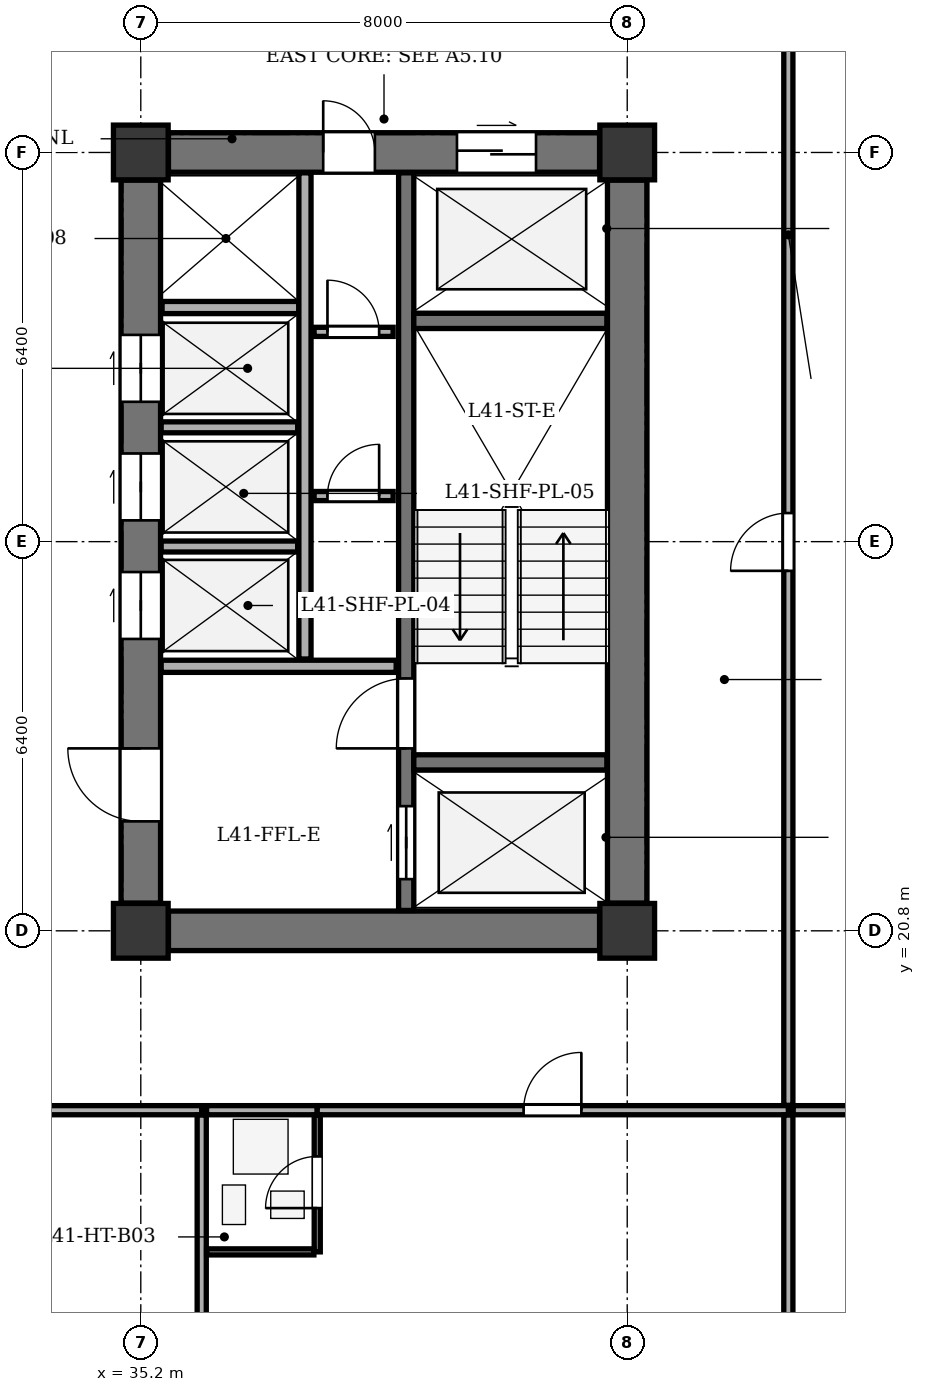
"""IFC4 building model, lengths in metres.
Left out: names, types, materials, properties, quantities, classifications, styles, units other than length and angle.
Written with IfcOpenShell. Run it as: python <this file> out.ifc"""

import sys

from ifc_helpers import new_model, si_unit, direction, frame, frame_2d, origin, origin_2d, place, context, subcontext, project, spatial, rectangle, extrude, element, fill, save


model = new_model("IFC4")
c1 = context("Model", 3, precision=1e-05, world=origin(), true_north=direction((0.0, 1.0)))
c2 = subcontext(c1, "Body", "Model", "MODEL_VIEW")
j1 = project(units=[si_unit("LENGTHUNIT", "METRE"), si_unit("PLANEANGLEUNIT", "RADIAN")], contexts=[c1])
p1 = place(None, origin())
s1 = spatial("IfcSite", under=j1, at=p1, CompositionType="ELEMENT")
p2 = place(p1, origin())
s2 = spatial("IfcBuilding", under=s1, at=p2, CompositionType="ELEMENT")
p3 = place(p2, frame((0.0, 0.0, 162.3)))
s3 = spatial("IfcBuildingStorey", under=s2, at=p3, CompositionType="ELEMENT", Elevation=162.3)
for number, where, z_axis, x_axis in (
    (1, (35.2, 20.8, 0.0), (0.0, 0.0, 1.0), (1.0, 0.0, 0.0)),
    (2, (43.2, 20.8, 0.0), (0.0, 0.0, 1.0), (1.0, 0.0, 0.0)),
    (3, (35.2, 33.6, 0.0), (0.0, 0.0, 1.0), (1.0, 0.0, 0.0)),
    (4, (43.2, 33.6, 0.0), (0.0, 0.0, 1.0), (1.0, 0.0, 0.0)),
):
    element("IfcColumn", number, at=place(p3, frame(where, z_axis=z_axis, x_axis=x_axis)), inside=s3, PredefinedType="COLUMN", context=c2, shape_type="SweptSolid", body=[
        extrude(rectangle(XDim=0.9, YDim=0.9, at=origin_2d()), origin(), (0.0, 0.0, 1.0), 3.5),
    ])
p4 = place(p3, frame((43.2, 21.255, 0.0), z_axis=(0.0, 0.0, 1.0), x_axis=(0.0, 1.0, 0.0)))
e5 = element("IfcWall", 5, at=p4, inside=s3, PredefinedType="SHEAR", context=c2, shape_type="SweptSolid", body=[
    extrude(rectangle(XDim=11.89, YDim=0.65, at=frame_2d((5.945, 0.0))), origin(), (0.0, 0.0, 1.0), 3.2),
])
p5 = place(p3, frame((35.655, 20.8, 0.0), z_axis=(0.0, 0.0, 1.0), x_axis=(1.0, 0.0, 0.0)))
e6 = element("IfcWall", 6, at=p5, inside=s3, PredefinedType="SHEAR", context=c2, shape_type="SweptSolid", body=[
    extrude(rectangle(XDim=7.09, YDim=0.65, at=frame_2d((3.545, 0.0))), origin(), (0.0, 0.0, 1.0), 3.2),
])
p6 = place(p3, frame((35.655, 33.6, 0.0), z_axis=(0.0, 0.0, 1.0), x_axis=(1.0, 0.0, 0.0)))
e7 = element("IfcWall", 7, at=p6, inside=s3, PredefinedType="SHEAR", context=c2, shape_type="SweptSolid", body=[
    extrude(rectangle(XDim=7.09, YDim=0.65, at=frame_2d((3.545, 0.0))), origin(), (0.0, 0.0, 1.0), 3.2),
])
p7 = place(p6, frame((4.745, 0.0, 0.0)))
e8 = element("IfcOpeningElement", 8, at=p7, cuts=e7, PredefinedType="OPENING", context=c2, shape_type="SweptSolid", body=[
    extrude(rectangle(XDim=1.3, YDim=2.15, at=frame_2d((0.65, 1.075))), frame((0.0, 0.335, 0.0), z_axis=(0.0, -1.0, 0.0), x_axis=(1.0, 0.0, 0.0)), (0.0, 0.0, 1.0), 0.67),
])
p8 = place(p6, frame((2.545, 0.0, 0.0)))
e9 = element("IfcOpeningElement", 9, at=p8, cuts=e7, PredefinedType="OPENING", context=c2, shape_type="SweptSolid", body=[
    extrude(rectangle(XDim=0.85, YDim=2.02, at=frame_2d((0.425, 1.01))), frame((0.0, 0.335, 0.0), z_axis=(0.0, -1.0, 0.0), x_axis=(1.0, 0.0, 0.0)), (0.0, 0.0, 1.0), 0.67),
])
p9 = place(p3, frame((35.2, 21.255, 0.0), z_axis=(0.0, 0.0, 1.0), x_axis=(0.0, 1.0, 0.0)))
e10 = element("IfcWall", 10, at=p9, inside=s3, PredefinedType="SHEAR", context=c2, shape_type="SweptSolid", body=[
    extrude(rectangle(XDim=11.89, YDim=0.65, at=frame_2d((5.945, 0.0))), origin(), (0.0, 0.0, 1.0), 3.2),
])
p10 = place(p9, frame((1.345, 0.0, 0.0)))
e11 = element("IfcOpeningElement", 11, at=p10, cuts=e10, PredefinedType="OPENING", context=c2, shape_type="SweptSolid", body=[
    extrude(rectangle(XDim=1.2, YDim=2.15, at=frame_2d((0.6, 1.075))), frame((0.0, 0.335, 0.0), z_axis=(0.0, -1.0, 0.0), x_axis=(1.0, 0.0, 0.0)), (0.0, 0.0, 1.0), 0.67),
])
p11 = place(p9, frame((4.345, 0.0, 0.0)))
e12 = element("IfcOpeningElement", 12, at=p11, cuts=e10, PredefinedType="OPENING", context=c2, shape_type="SweptSolid", body=[
    extrude(rectangle(XDim=1.1, YDim=2.1, at=frame_2d((0.55, 1.05))), frame((0.0, 0.335, 0.0), z_axis=(0.0, -1.0, 0.0), x_axis=(1.0, 0.0, 0.0)), (0.0, 0.0, 1.0), 0.67),
])
p12 = place(p9, frame((6.295, 0.0, 0.0)))
e13 = element("IfcOpeningElement", 13, at=p12, cuts=e10, PredefinedType="OPENING", context=c2, shape_type="SweptSolid", body=[
    extrude(rectangle(XDim=1.1, YDim=2.1, at=frame_2d((0.55, 1.05))), frame((0.0, 0.335, 0.0), z_axis=(0.0, -1.0, 0.0), x_axis=(1.0, 0.0, 0.0)), (0.0, 0.0, 1.0), 0.67),
])
p13 = place(p9, frame((8.245, 0.0, 0.0)))
e14 = element("IfcOpeningElement", 14, at=p13, cuts=e10, PredefinedType="OPENING", context=c2, shape_type="SweptSolid", body=[
    extrude(rectangle(XDim=1.1, YDim=2.1, at=frame_2d((0.55, 1.05))), frame((0.0, 0.335, 0.0), z_axis=(0.0, -1.0, 0.0), x_axis=(1.0, 0.0, 0.0)), (0.0, 0.0, 1.0), 0.67),
])
p14 = place(p3, frame((39.565, 21.135, 0.0), z_axis=(0.0, 0.0, 1.0), x_axis=(0.0, 1.0, 0.0)))
e15 = element("IfcWall", 15, at=p14, inside=s3, PredefinedType="SHEAR", context=c2, shape_type="SweptSolid", body=[
    extrude(rectangle(XDim=12.13, YDim=0.25, at=frame_2d((6.065, 0.0))), origin(), (0.0, 0.0, 1.0), 3.2),
])
p15 = place(p14, frame((0.515, 0.0, 0.0)))
e16 = element("IfcOpeningElement", 16, at=p15, cuts=e15, PredefinedType="OPENING", context=c2, shape_type="SweptSolid", body=[
    extrude(rectangle(XDim=1.2, YDim=2.15, at=frame_2d((0.6, 1.075))), frame((0.0, 0.135, 0.0), z_axis=(0.0, -1.0, 0.0), x_axis=(1.0, 0.0, 0.0)), (0.0, 0.0, 1.0), 0.27),
])
p16 = place(p14, frame((2.665, 0.0, 0.0)))
e17 = element("IfcOpeningElement", 17, at=p16, cuts=e15, PredefinedType="OPENING", context=c2, shape_type="SweptSolid", body=[
    extrude(rectangle(XDim=1.15, YDim=2.15, at=frame_2d((0.575, 1.075))), frame((0.0, 0.135, 0.0), z_axis=(0.0, -1.0, 0.0), x_axis=(1.0, 0.0, 0.0)), (0.0, 0.0, 1.0), 0.27),
])
for number, where, z_axis, x_axis in (
    (18, (39.69, 23.57, 0.0), (0.0, 0.0, 1.0), (1.0, 0.0, 0.0)),
    (19, (39.69, 30.83, 0.0), (0.0, 0.0, 1.0), (1.0, 0.0, 0.0)),
):
    element("IfcWall", number, at=place(p3, frame(where, z_axis=z_axis, x_axis=x_axis)), inside=s3, PredefinedType="SHEAR", context=c2, shape_type="SweptSolid", body=[
        extrude(rectangle(XDim=3.175, YDim=0.25, at=frame_2d((1.587, 0.0))), origin(), (0.0, 0.0, 1.0), 3.2),
    ])
p17 = place(p3, frame((35.535, 25.15, 0.0), z_axis=(0.0, 0.0, 1.0), x_axis=(1.0, 0.0, 0.0)))
e20 = element("IfcWall", 20, at=p17, inside=s3, PredefinedType="SOLIDWALL", context=c2, shape_type="SweptSolid", body=[
    extrude(rectangle(XDim=3.865, YDim=0.2, at=frame_2d((1.933, 0.0))), origin(), (0.0, 0.0, 1.0), 3.2),
])
p18 = place(p3, frame((35.55, 31.05, 0.0), z_axis=(0.0, 0.0, 1.0), x_axis=(1.0, 0.0, 0.0)))
e21 = element("IfcWall", 21, at=p18, inside=s3, PredefinedType="SOLIDWALL", context=c2, shape_type="SweptSolid", body=[
    extrude(rectangle(XDim=2.25, YDim=0.2, at=frame_2d((1.125, 0.0))), origin(), (0.0, 0.0, 1.0), 3.2),
])
p19 = place(p3, frame((37.9, 25.27, 0.0), z_axis=(0.0, 0.0, 1.0), x_axis=(0.0, 1.0, 0.0)))
e22 = element("IfcWall", 22, at=p19, inside=s3, PredefinedType="SOLIDWALL", context=c2, shape_type="SweptSolid", body=[
    extrude(rectangle(XDim=7.995, YDim=0.2, at=frame_2d((3.998, 0.0))), origin(), (0.0, 0.0, 1.0), 3.2),
])
for number, where, z_axis, x_axis in (
    (23, (35.535, 27.12, 0.0), (0.0, 0.0, 1.0), (1.0, 0.0, 0.0)),
    (24, (35.535, 29.08, 0.0), (0.0, 0.0, 1.0), (1.0, 0.0, 0.0)),
):
    element("IfcWall", number, at=place(p3, frame(where, z_axis=z_axis, x_axis=x_axis)), inside=s3, PredefinedType="PARTITIONING", context=c2, shape_type="SweptSolid", body=[
        extrude(rectangle(XDim=2.245, YDim=0.18, at=frame_2d((1.123, 0.0))), origin(), (0.0, 0.0, 1.0), 3.2),
    ])
p20 = place(p3, frame((38.05, 27.95, 0.0), z_axis=(0.0, 0.0, 1.0), x_axis=(1.0, 0.0, 0.0)))
e25 = element("IfcWall", 25, at=p20, inside=s3, PredefinedType="PARTITIONING", context=c2, shape_type="SweptSolid", body=[
    extrude(rectangle(XDim=1.3, YDim=0.15, at=frame_2d((0.65, 0.0))), origin(), (0.0, 0.0, 1.0), 3.2),
])
p21 = place(p20, frame((0.22, 0.0, 0.0)))
e26 = element("IfcOpeningElement", 26, at=p21, cuts=e25, PredefinedType="OPENING", context=c2, shape_type="SweptSolid", body=[
    extrude(rectangle(XDim=0.85, YDim=2.02, at=frame_2d((0.425, 1.01))), frame((0.0, 0.085, 0.0), z_axis=(0.0, -1.0, 0.0), x_axis=(1.0, 0.0, 0.0)), (0.0, 0.0, 1.0), 0.17),
])
p22 = place(p3, frame((38.05, 30.65, 0.0), z_axis=(0.0, 0.0, 1.0), x_axis=(1.0, 0.0, 0.0)))
e27 = element("IfcWall", 27, at=p22, inside=s3, PredefinedType="PARTITIONING", context=c2, shape_type="SweptSolid", body=[
    extrude(rectangle(XDim=1.3, YDim=0.15, at=frame_2d((0.65, 0.0))), origin(), (0.0, 0.0, 1.0), 3.2),
])
p23 = place(p22, frame((0.22, 0.0, 0.0)))
e28 = element("IfcOpeningElement", 28, at=p23, cuts=e27, PredefinedType="OPENING", context=c2, shape_type="SweptSolid", body=[
    extrude(rectangle(XDim=0.85, YDim=2.02, at=frame_2d((0.425, 1.01))), frame((0.0, 0.085, 0.0), z_axis=(0.0, -1.0, 0.0), x_axis=(1.0, 0.0, 0.0)), (0.0, 0.0, 1.0), 0.17),
])
p24 = place(p3, frame((27.549, 17.85, 0.0), z_axis=(0.0, 0.0, 1.0), x_axis=(1.0, 0.0, 0.0)))
e29 = element("IfcWall", 29, at=p24, inside=s3, PredefinedType="PARTITIONING", context=c2, shape_type="SweptSolid", body=[
    extrude(rectangle(XDim=8.653, YDim=0.15, at=frame_2d((4.326, 0.0))), origin(), (0.0, 0.0, 1.0), 3.2),
])
p25 = place(p24, frame((3.846, 0.0, 0.0)))
e30 = element("IfcOpeningElement", 30, at=p25, cuts=e29, PredefinedType="OPENING", context=c2, shape_type="SweptSolid", body=[
    extrude(rectangle(XDim=0.95, YDim=2.1, at=frame_2d((0.475, 1.05))), frame((0.0, 0.085, 0.0), z_axis=(0.0, -1.0, 0.0), x_axis=(1.0, 0.0, 0.0)), (0.0, 0.0, 1.0), 0.17),
])
p26 = place(p3, frame((36.202, 8.275, 0.0), z_axis=(0.0, 0.0, 1.0), x_axis=(0.0, 1.0, 0.0)))
e31 = element("IfcWall", 31, at=p26, inside=s3, PredefinedType="PARTITIONING", context=c2, shape_type="SweptSolid", body=[
    extrude(rectangle(XDim=9.495, YDim=0.15, at=frame_2d((4.748, 0.0))), origin(), (0.0, 0.0, 1.0), 3.2),
])
p27 = place(p3, frame((36.282, 17.85, 0.0), z_axis=(0.0, 0.0, 1.0), x_axis=(1.0, 0.0, 0.0)))
e32 = element("IfcWall", 32, at=p27, inside=s3, PredefinedType="PARTITIONING", context=c2, shape_type="SweptSolid", body=[
    extrude(rectangle(XDim=1.82, YDim=0.15, at=frame_2d((0.91, 0.0))), origin(), (0.0, 0.0, 1.0), 3.2),
])
p28 = place(p3, frame((38.102, 17.85, 0.0), z_axis=(0.0, 0.0, 1.0), x_axis=(1.0, 0.0, 0.0)))
e33 = element("IfcWall", 33, at=p28, inside=s3, PredefinedType="PARTITIONING", context=c2, shape_type="SweptSolid", body=[
    extrude(rectangle(XDim=7.748, YDim=0.15, at=frame_2d((3.874, 0.0))), origin(), (0.0, 0.0, 1.0), 3.2),
])
p29 = place(p28, frame((3.394, 0.0, 0.0)))
e34 = element("IfcOpeningElement", 34, at=p29, cuts=e33, PredefinedType="OPENING", context=c2, shape_type="SweptSolid", body=[
    extrude(rectangle(XDim=0.95, YDim=2.1, at=frame_2d((0.475, 1.05))), frame((0.0, 0.085, 0.0), z_axis=(0.0, -1.0, 0.0), x_axis=(1.0, 0.0, 0.0)), (0.0, 0.0, 1.0), 0.17),
])
p30 = place(p3, frame((38.102, 15.52, 0.0), z_axis=(0.0, 0.0, 1.0), x_axis=(0.0, 1.0, 0.0)))
e35 = element("IfcWall", 35, at=p30, inside=s3, PredefinedType="PARTITIONING", context=c2, shape_type="SweptSolid", body=[
    extrude(rectangle(XDim=2.25, YDim=0.1, at=frame_2d((1.125, 0.0))), origin(), (0.0, 0.0, 1.0), 3.2),
])
p31 = place(p30, frame((0.72, 0.0, 0.0)))
e36 = element("IfcOpeningElement", 36, at=p31, cuts=e35, PredefinedType="OPENING", context=c2, shape_type="SweptSolid", body=[
    extrude(rectangle(XDim=0.85, YDim=2.05, at=frame_2d((0.425, 1.025))), frame((0.0, 0.06, 0.0), z_axis=(0.0, -1.0, 0.0), x_axis=(1.0, 0.0, 0.0)), (0.0, 0.0, 1.0), 0.12),
])
p32 = place(p3, frame((36.282, 15.52, 0.0), z_axis=(0.0, 0.0, 1.0), x_axis=(1.0, 0.0, 0.0)))
e37 = element("IfcWall", 37, at=p32, inside=s3, PredefinedType="PARTITIONING", context=c2, shape_type="SweptSolid", body=[
    extrude(rectangle(XDim=1.765, YDim=0.1, at=frame_2d((0.883, 0.0))), origin(), (0.0, 0.0, 1.0), 3.2),
])
p33 = place(p3, frame((45.85, 8.275, 0.0), z_axis=(0.0, 0.0, 1.0), x_axis=(0.0, 1.0, 0.0)))
e38 = element("IfcWall", 38, at=p33, inside=s3, PredefinedType="PARTITIONING", context=c2, shape_type="SweptSolid", body=[
    extrude(rectangle(XDim=9.495, YDim=0.15, at=frame_2d((4.748, 0.0))), origin(), (0.0, 0.0, 1.0), 3.2),
])
p34 = place(p3, frame((45.93, 17.85, 0.0), z_axis=(0.0, 0.0, 1.0), x_axis=(1.0, 0.0, 0.0)))
e39 = element("IfcWall", 39, at=p34, inside=s3, PredefinedType="PARTITIONING", context=c2, shape_type="SweptSolid", body=[
    extrude(rectangle(XDim=9.395, YDim=0.15, at=frame_2d((4.698, 0.0))), origin(), (0.0, 0.0, 1.0), 3.2),
])
p35 = place(p3, frame((45.85, 17.93, 0.0), z_axis=(0.0, 0.0, 1.0), x_axis=(0.0, 1.0, 0.0)))
e40 = element("IfcWall", 40, at=p35, inside=s3, PredefinedType="PARTITIONING", context=c2, shape_type="SweptSolid", body=[
    extrude(rectangle(XDim=18.54, YDim=0.15, at=frame_2d((9.27, 0.0))), origin(), (0.0, 0.0, 1.0), 3.2),
])
p36 = place(p35, frame((8.79, 0.0, 0.0)))
e41 = element("IfcOpeningElement", 41, at=p36, cuts=e40, PredefinedType="OPENING", context=c2, shape_type="SweptSolid", body=[
    extrude(rectangle(XDim=0.95, YDim=2.1, at=frame_2d((0.475, 1.05))), frame((0.0, 0.085, 0.0), z_axis=(0.0, -1.0, 0.0), x_axis=(1.0, 0.0, 0.0)), (0.0, 0.0, 1.0), 0.17),
])
p37 = place(p7, origin())
e42 = element("IfcDoor", 42, at=p37, inside=s3, OperationType="DOUBLE_DOOR_SLIDING", PredefinedType="DOOR", context=c2, shape_type="SweptSolid", body=[
    extrude(rectangle(XDim=1.3, YDim=2.15, at=frame_2d((0.65, 1.075))), frame((0.0, 0.025, 0.0), z_axis=(0.0, -1.0, 0.0), x_axis=(1.0, 0.0, 0.0)), (0.0, 0.0, 1.0), 0.05),
])
fill(e8, e42)
p38 = place(p8, origin())
e43 = element("IfcDoor", 43, at=p38, inside=s3, OperationType="SINGLE_SWING_LEFT", PredefinedType="DOOR", context=c2, shape_type="SweptSolid", body=[
    extrude(rectangle(XDim=0.85, YDim=2.02, at=frame_2d((0.425, 1.01))), frame((0.0, 0.025, 0.0), z_axis=(0.0, -1.0, 0.0), x_axis=(1.0, 0.0, 0.0)), (0.0, 0.0, 1.0), 0.05),
])
fill(e9, e43)
p39 = place(p10, origin())
e44 = element("IfcDoor", 44, at=p39, inside=s3, OperationType="SINGLE_SWING_RIGHT", PredefinedType="DOOR", context=c2, shape_type="SweptSolid", body=[
    extrude(rectangle(XDim=1.2, YDim=2.15, at=frame_2d((0.6, 1.075))), frame((0.0, 0.025, 0.0), z_axis=(0.0, -1.0, 0.0), x_axis=(1.0, 0.0, 0.0)), (0.0, 0.0, 1.0), 0.05),
])
fill(e11, e44)
p40 = place(p11, origin())
e45 = element("IfcDoor", 45, at=p40, inside=s3, OperationType="DOUBLE_DOOR_SLIDING", PredefinedType="DOOR", context=c2, shape_type="SweptSolid", body=[
    extrude(rectangle(XDim=1.1, YDim=2.1, at=frame_2d((0.55, 1.05))), frame((0.0, 0.025, 0.0), z_axis=(0.0, -1.0, 0.0), x_axis=(1.0, 0.0, 0.0)), (0.0, 0.0, 1.0), 0.05),
])
fill(e12, e45)
p41 = place(p12, origin())
e46 = element("IfcDoor", 46, at=p41, inside=s3, OperationType="DOUBLE_DOOR_SLIDING", PredefinedType="DOOR", context=c2, shape_type="SweptSolid", body=[
    extrude(rectangle(XDim=1.1, YDim=2.1, at=frame_2d((0.55, 1.05))), frame((0.0, 0.025, 0.0), z_axis=(0.0, -1.0, 0.0), x_axis=(1.0, 0.0, 0.0)), (0.0, 0.0, 1.0), 0.05),
])
fill(e13, e46)
p42 = place(p13, origin())
e47 = element("IfcDoor", 47, at=p42, inside=s3, OperationType="DOUBLE_DOOR_SLIDING", PredefinedType="DOOR", context=c2, shape_type="SweptSolid", body=[
    extrude(rectangle(XDim=1.1, YDim=2.1, at=frame_2d((0.55, 1.05))), frame((0.0, 0.025, 0.0), z_axis=(0.0, -1.0, 0.0), x_axis=(1.0, 0.0, 0.0)), (0.0, 0.0, 1.0), 0.05),
])
fill(e14, e47)
p43 = place(p15, origin())
e48 = element("IfcDoor", 48, at=p43, inside=s3, OperationType="DOUBLE_DOOR_SLIDING", PredefinedType="DOOR", context=c2, shape_type="SweptSolid", body=[
    extrude(rectangle(XDim=1.2, YDim=2.15, at=frame_2d((0.6, 1.075))), frame((0.0, 0.025, 0.0), z_axis=(0.0, -1.0, 0.0), x_axis=(1.0, 0.0, 0.0)), (0.0, 0.0, 1.0), 0.05),
])
fill(e16, e48)
p44 = place(p16, origin())
e49 = element("IfcDoor", 49, at=p44, inside=s3, OperationType="SINGLE_SWING_LEFT", PredefinedType="DOOR", context=c2, shape_type="SweptSolid", body=[
    extrude(rectangle(XDim=1.15, YDim=2.15, at=frame_2d((0.575, 1.075))), frame((0.0, 0.025, 0.0), z_axis=(0.0, -1.0, 0.0), x_axis=(1.0, 0.0, 0.0)), (0.0, 0.0, 1.0), 0.05),
])
fill(e17, e49)
p45 = place(p21, origin())
e50 = element("IfcDoor", 50, at=p45, inside=s3, OperationType="SINGLE_SWING_RIGHT", PredefinedType="DOOR", context=c2, shape_type="SweptSolid", body=[
    extrude(rectangle(XDim=0.85, YDim=2.02, at=frame_2d((0.425, 1.01))), frame((0.0, 0.025, 0.0), z_axis=(0.0, -1.0, 0.0), x_axis=(1.0, 0.0, 0.0)), (0.0, 0.0, 1.0), 0.05),
])
fill(e26, e50)
p46 = place(p23, origin())
e51 = element("IfcDoor", 51, at=p46, inside=s3, OperationType="SINGLE_SWING_LEFT", PredefinedType="DOOR", context=c2, shape_type="SweptSolid", body=[
    extrude(rectangle(XDim=0.85, YDim=2.02, at=frame_2d((0.425, 1.01))), frame((0.0, 0.025, 0.0), z_axis=(0.0, -1.0, 0.0), x_axis=(1.0, 0.0, 0.0)), (0.0, 0.0, 1.0), 0.05),
])
fill(e28, e51)
p47 = place(p31, origin())
e52 = element("IfcDoor", 52, at=p47, inside=s3, OperationType="SINGLE_SWING_LEFT", PredefinedType="DOOR", context=c2, shape_type="SweptSolid", body=[
    extrude(rectangle(XDim=0.85, YDim=2.05, at=frame_2d((0.425, 1.025))), frame((0.0, 0.025, 0.0), z_axis=(0.0, -1.0, 0.0), x_axis=(1.0, 0.0, 0.0)), (0.0, 0.0, 1.0), 0.05),
])
fill(e36, e52)
p48 = place(p29, origin())
e53 = element("IfcDoor", 53, at=p48, inside=s3, OperationType="SINGLE_SWING_RIGHT", PredefinedType="DOOR", context=c2, shape_type="SweptSolid", body=[
    extrude(rectangle(XDim=0.95, YDim=2.1, at=frame_2d((0.475, 1.05))), frame((0.0, 0.025, 0.0), z_axis=(0.0, -1.0, 0.0), x_axis=(1.0, 0.0, 0.0)), (0.0, 0.0, 1.0), 0.05),
])
fill(e34, e53)
p49 = place(p36, origin())
e54 = element("IfcDoor", 54, at=p49, inside=s3, OperationType="SINGLE_SWING_LEFT", PredefinedType="DOOR", context=c2, shape_type="SweptSolid", body=[
    extrude(rectangle(XDim=0.95, YDim=2.1, at=frame_2d((0.475, 1.05))), frame((0.0, 0.025, 0.0), z_axis=(0.0, -1.0, 0.0), x_axis=(1.0, 0.0, 0.0)), (0.0, 0.0, 1.0), 0.05),
])
fill(e41, e54)
save(model, sys.argv[1])
